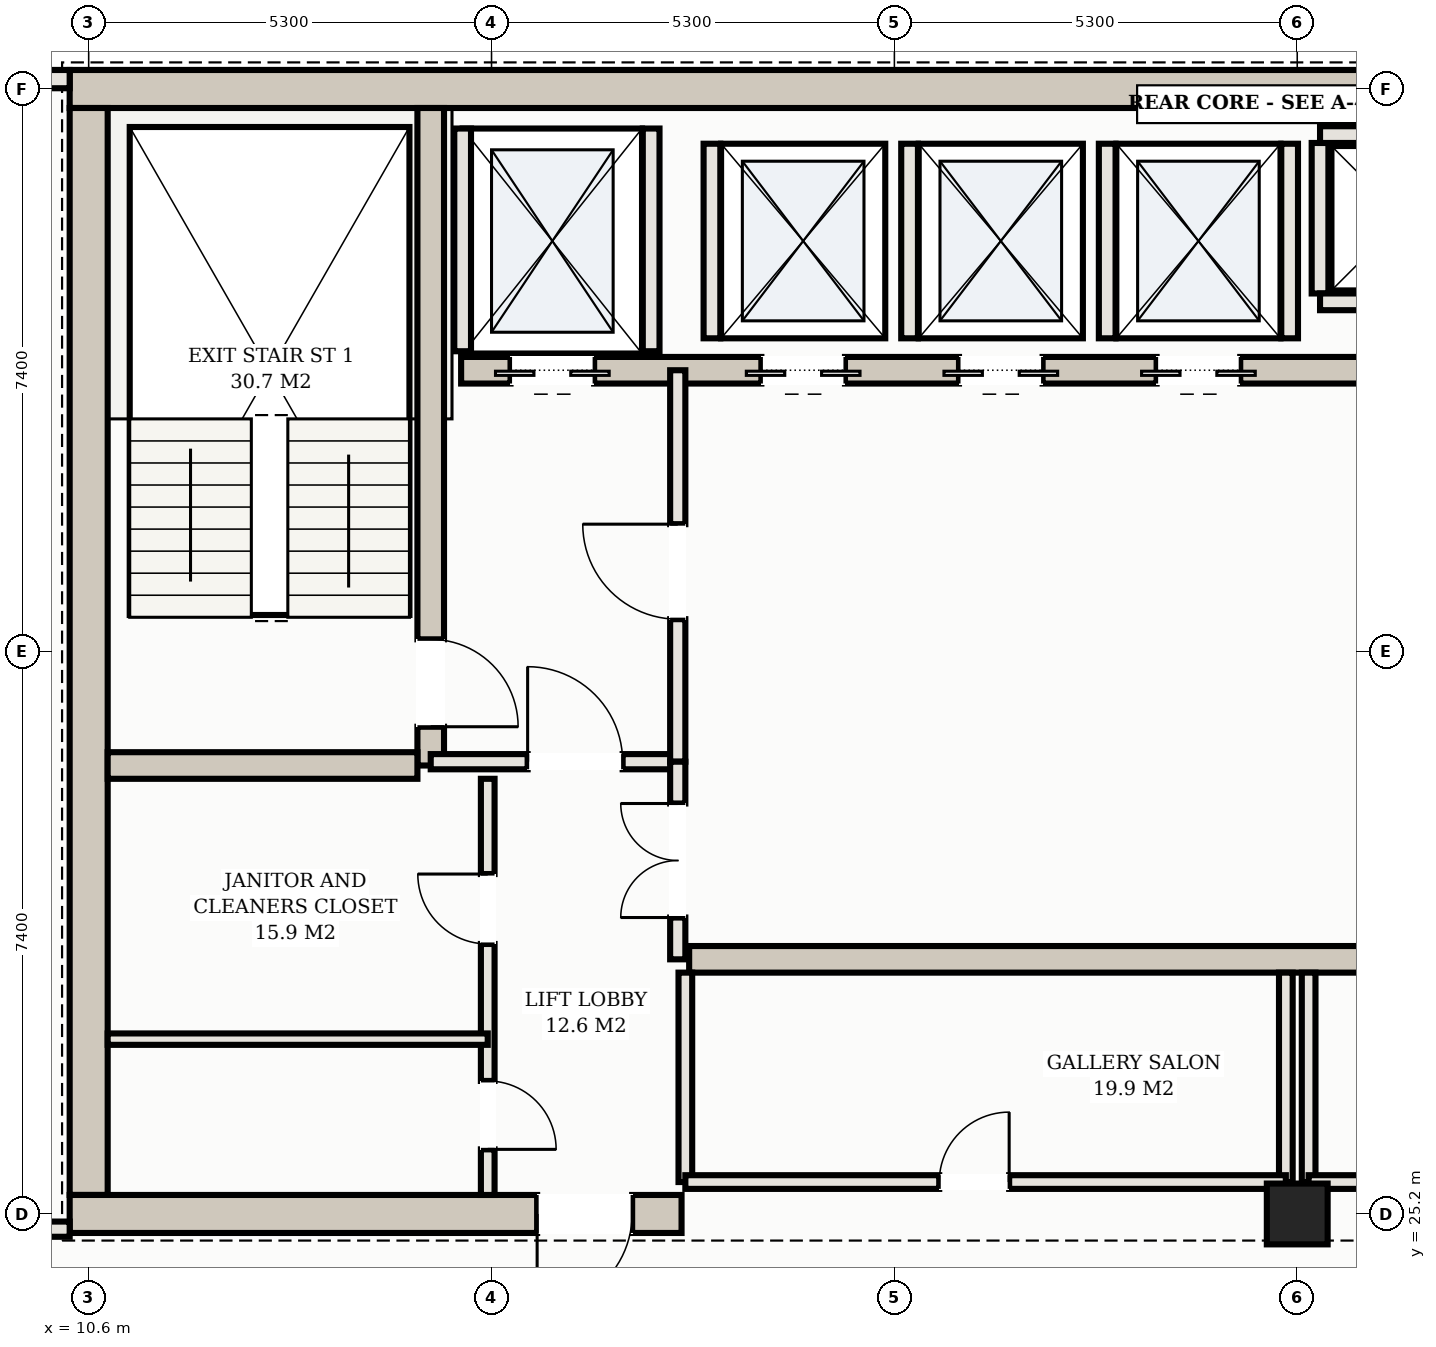
"""IFC4 building model, lengths in metres.
Left out: names, types, materials, properties, quantities, classifications, styles, units other than length and angle.
Written with IfcOpenShell. Run it as: python <this file> out.ifc"""

import sys

from ifc_helpers import new_model, si_unit, direction, frame, frame_2d, origin, origin_2d, place, context, subcontext, project, spatial, rectangle, hollow_rectangle, extrude, element, fill, save


model = new_model("IFC4")
c1 = context("Model", 3, precision=1e-05, world=origin(), true_north=direction((0.0, 1.0)))
c2 = subcontext(c1, "Body", "Model", "MODEL_VIEW")
j1 = project(units=[si_unit("LENGTHUNIT", "METRE"), si_unit("PLANEANGLEUNIT", "RADIAN")], contexts=[c1])
p1 = place(None, origin())
s1 = spatial("IfcSite", under=j1, at=p1, CompositionType="ELEMENT")
p2 = place(p1, origin())
s2 = spatial("IfcBuilding", under=s1, at=p2, CompositionType="ELEMENT")
p3 = place(p2, frame((0.0, 0.0, 209.9)))
s3 = spatial("IfcBuildingStorey", under=s2, at=p3, CompositionType="ELEMENT", Elevation=209.9)
p4 = place(p3, frame((10.35, 40.0, 0.0), z_axis=(0.0, 0.0, 1.0), x_axis=(1.0, 0.0, 0.0)))
e1 = element("IfcWall", 1, at=p4, inside=s3, PredefinedType="SHEAR", context=c2, shape_type="SweptSolid", body=[
    extrude(rectangle(XDim=32.3, YDim=0.5, at=frame_2d((16.15, 0.0))), origin(), (0.0, 0.0, 1.0), 3.11),
])
p5 = place(p3, frame((10.6, 25.45, 0.0), z_axis=(0.0, 0.0, 1.0), x_axis=(0.0, 1.0, 0.0)))
e2 = element("IfcWall", 2, at=p5, inside=s3, PredefinedType="SHEAR", context=c2, shape_type="SweptSolid", body=[
    extrude(rectangle(XDim=14.3, YDim=0.5, at=frame_2d((7.15, 0.0))), origin(), (0.0, 0.0, 1.0), 3.11),
])
p6 = place(p3, frame((10.35, 25.2, 0.0), z_axis=(0.0, 0.0, 1.0), x_axis=(1.0, 0.0, 0.0)))
e3 = element("IfcWall", 3, at=p6, inside=s3, PredefinedType="SHEAR", context=c2, shape_type="SweptSolid", body=[
    extrude(rectangle(XDim=8.05, YDim=0.5, at=frame_2d((4.025, 0.0))), origin(), (0.0, 0.0, 1.0), 3.11),
])
p7 = place(p6, frame((6.15, 0.0, 0.0)))
e4 = element("IfcOpeningElement", 4, at=p7, cuts=e3, PredefinedType="OPENING", context=c2, shape_type="SweptSolid", body=[
    extrude(rectangle(XDim=1.25, YDim=2.2, at=frame_2d((0.625, 1.1))), frame((0.0, 0.26, 0.0), z_axis=(0.0, -1.0, 0.0), x_axis=(1.0, 0.0, 0.0)), (0.0, 0.0, 1.0), 0.52),
])
p8 = place(p3, frame((15.1, 31.1, 0.0), z_axis=(0.0, 0.0, 1.0), x_axis=(0.0, 1.0, 0.0)))
e5 = element("IfcWall", 5, at=p8, inside=s3, PredefinedType="SHEAR", context=c2, shape_type="SweptSolid", body=[
    extrude(rectangle(XDim=8.65, YDim=0.35, at=frame_2d((4.325, 0.0))), origin(), (0.0, 0.0, 1.0), 3.11),
])
p9 = place(p8, frame((0.51, 0.0, 0.0)))
e6 = element("IfcOpeningElement", 6, at=p9, cuts=e5, PredefinedType="OPENING", context=c2, shape_type="SweptSolid", body=[
    extrude(rectangle(XDim=1.15, YDim=2.2, at=frame_2d((0.575, 1.1))), frame((0.0, 0.185, 0.0), z_axis=(0.0, -1.0, 0.0), x_axis=(1.0, 0.0, 0.0)), (0.0, 0.0, 1.0), 0.37),
])
p10 = place(p3, frame((10.85, 31.1, 0.0), z_axis=(0.0, 0.0, 1.0), x_axis=(1.0, 0.0, 0.0)))
e7 = element("IfcWall", 7, at=p10, inside=s3, PredefinedType="SHEAR", context=c2, shape_type="SweptSolid", body=[
    extrude(rectangle(XDim=4.075, YDim=0.35, at=frame_2d((2.038, 0.0))), origin(), (0.0, 0.0, 1.0), 3.11),
])
p11 = place(p3, frame((15.5, 36.3, 0.0), z_axis=(0.0, 0.0, 1.0), x_axis=(1.0, 0.0, 0.0)))
e8 = element("IfcWall", 8, at=p11, inside=s3, PredefinedType="SHEAR", context=c2, shape_type="SweptSolid", body=[
    extrude(rectangle(XDim=22.0, YDim=0.35, at=frame_2d((11.0, 0.0))), origin(), (0.0, 0.0, 1.0), 3.11),
])
p12 = place(p11, frame((0.65, 0.0, 0.0)))
e9 = element("IfcOpeningElement", 9, at=p12, cuts=e8, PredefinedType="OPENING", context=c2, shape_type="SweptSolid", body=[
    extrude(rectangle(XDim=1.1, YDim=2.15, at=frame_2d((0.55, 1.075))), frame((0.0, 0.185, 0.0), z_axis=(0.0, -1.0, 0.0), x_axis=(1.0, 0.0, 0.0)), (0.0, 0.0, 1.0), 0.37),
])
p13 = place(p11, frame((20.25, 0.0, 0.0)))
e10 = element("IfcOpeningElement", 10, at=p13, cuts=e8, PredefinedType="OPENING", context=c2, shape_type="SweptSolid", body=[
    extrude(rectangle(XDim=1.1, YDim=2.15, at=frame_2d((0.55, 1.075))), frame((0.0, 0.185, 0.0), z_axis=(0.0, -1.0, 0.0), x_axis=(1.0, 0.0, 0.0)), (0.0, 0.0, 1.0), 0.37),
])
p14 = place(p11, frame((17.05, 0.0, 0.0)))
e11 = element("IfcOpeningElement", 11, at=p14, cuts=e8, PredefinedType="OPENING", context=c2, shape_type="SweptSolid", body=[
    extrude(rectangle(XDim=1.3, YDim=2.2, at=frame_2d((0.65, 1.1))), frame((0.0, 0.185, 0.0), z_axis=(0.0, -1.0, 0.0), x_axis=(1.0, 0.0, 0.0)), (0.0, 0.0, 1.0), 0.37),
])
p15 = place(p11, frame((3.95, 0.0, 0.0)))
e12 = element("IfcOpeningElement", 12, at=p15, cuts=e8, PredefinedType="OPENING", context=c2, shape_type="SweptSolid", body=[
    extrude(rectangle(XDim=1.1, YDim=2.15, at=frame_2d((0.55, 1.075))), frame((0.0, 0.185, 0.0), z_axis=(0.0, -1.0, 0.0), x_axis=(1.0, 0.0, 0.0)), (0.0, 0.0, 1.0), 0.37),
])
p16 = place(p11, frame((6.55, 0.0, 0.0)))
e13 = element("IfcOpeningElement", 13, at=p16, cuts=e8, PredefinedType="OPENING", context=c2, shape_type="SweptSolid", body=[
    extrude(rectangle(XDim=1.1, YDim=2.15, at=frame_2d((0.55, 1.075))), frame((0.0, 0.185, 0.0), z_axis=(0.0, -1.0, 0.0), x_axis=(1.0, 0.0, 0.0)), (0.0, 0.0, 1.0), 0.37),
])
p17 = place(p11, frame((9.15, 0.0, 0.0)))
e14 = element("IfcOpeningElement", 14, at=p17, cuts=e8, PredefinedType="OPENING", context=c2, shape_type="SweptSolid", body=[
    extrude(rectangle(XDim=1.1, YDim=2.15, at=frame_2d((0.55, 1.075))), frame((0.0, 0.185, 0.0), z_axis=(0.0, -1.0, 0.0), x_axis=(1.0, 0.0, 0.0)), (0.0, 0.0, 1.0), 0.37),
])
p18 = place(p3, frame((18.5, 28.55, 0.0), z_axis=(0.0, 0.0, 1.0), x_axis=(1.0, 0.0, 0.0)))
e15 = element("IfcWall", 15, at=p18, inside=s3, PredefinedType="SHEAR", context=c2, shape_type="SweptSolid", body=[
    extrude(rectangle(XDim=16.0, YDim=0.35, at=frame_2d((8.0, 0.0))), origin(), (0.0, 0.0, 1.0), 3.11),
])
p19 = place(p3, frame((26.5, 25.2, 0.0), z_axis=(0.0, 0.0, 1.0), x_axis=(1.0, 0.0, 0.0)))
e16 = element("IfcColumn", 16, at=p19, inside=s3, PredefinedType="COLUMN", context=c2, shape_type="SweptSolid", body=[
    extrude(hollow_rectangle(XDim=0.8, YDim=0.8, WallThickness=0.028, at=origin_2d()), origin(), (0.0, 0.0, 1.0), 3.3),
])
for number, where, z_axis, x_axis in (
    (17, (15.52, 36.55, 0.0), (0.0, 0.0, 1.0), (0.0, 1.0, 0.0)),
    (18, (18.0, 36.55, 0.0), (0.0, 0.0, 1.0), (0.0, 1.0, 0.0)),
):
    element("IfcWall", number, at=place(p3, frame(where, z_axis=z_axis, x_axis=x_axis)), inside=s3, PredefinedType="SOLIDWALL", context=c2, shape_type="SweptSolid", body=[
        extrude(rectangle(XDim=2.93, YDim=0.22, at=frame_2d((1.465, 0.0))), origin(), (0.0, 0.0, 1.0), 3.11),
    ])
for number, where, z_axis, x_axis in (
    (19, (18.8, 36.72, 0.0), (0.0, 0.0, 1.0), (0.0, 1.0, 0.0)),
    (20, (21.4, 36.72, 0.0), (0.0, 0.0, 1.0), (0.0, 1.0, 0.0)),
    (21, (24.0, 36.72, 0.0), (0.0, 0.0, 1.0), (0.0, 1.0, 0.0)),
    (22, (26.4, 36.72, 0.0), (0.0, 0.0, 1.0), (0.0, 1.0, 0.0)),
):
    element("IfcWall", number, at=place(p3, frame(where, z_axis=z_axis, x_axis=x_axis)), inside=s3, PredefinedType="SOLIDWALL", context=c2, shape_type="SweptSolid", body=[
        extrude(rectangle(XDim=2.56, YDim=0.22, at=frame_2d((1.28, 0.0))), origin(), (0.0, 0.0, 1.0), 3.11),
    ])
p20 = place(p3, frame((26.8, 37.31, 0.0), z_axis=(0.0, 0.0, 1.0), x_axis=(0.0, 1.0, 0.0)))
e23 = element("IfcWall", 23, at=p20, inside=s3, PredefinedType="SOLIDWALL", context=c2, shape_type="SweptSolid", body=[
    extrude(rectangle(XDim=1.98, YDim=0.22, at=frame_2d((0.99, 0.0))), origin(), (0.0, 0.0, 1.0), 3.11),
])
for number, where, z_axis, x_axis in (
    (24, (26.8, 39.4, 0.0), (0.0, 0.0, 1.0), (1.0, 0.0, 0.0)),
    (25, (26.8, 37.2, 0.0), (0.0, 0.0, 1.0), (1.0, 0.0, 0.0)),
):
    element("IfcWall", number, at=place(p3, frame(where, z_axis=z_axis, x_axis=x_axis)), inside=s3, PredefinedType="SOLIDWALL", context=c2, shape_type="SweptSolid", body=[
        extrude(rectangle(XDim=2.2, YDim=0.22, at=frame_2d((1.1, 0.0))), origin(), (0.0, 0.0, 1.0), 3.11),
    ])
p21 = place(p3, frame((10.35, 40.13, 0.0), z_axis=(0.0, 0.0, 1.0), x_axis=(-1.0, 0.0, 0.0)))
e26 = element("IfcWall", 26, at=p21, inside=s3, PredefinedType="SOLIDWALL", context=c2, shape_type="SweptSolid", body=[
    extrude(rectangle(XDim=0.3, YDim=0.24, at=frame_2d((0.15, 0.0))), origin(), (0.0, 0.0, 1.0), 3.11),
])
p22 = place(p3, frame((15.1, 31.15, 0.0), z_axis=(0.0, 0.0, 1.0), x_axis=(1.0, 0.0, 0.0)))
e27 = element("IfcWall", 27, at=p22, inside=s3, PredefinedType="PARTITIONING", context=c2, shape_type="SweptSolid", body=[
    extrude(rectangle(XDim=3.25, YDim=0.2, at=frame_2d((1.625, 0.0))), origin(), (0.0, 0.0, 1.0), 2.43),
])
p23 = place(p22, frame((1.275, 0.0, 0.0)))
e28 = element("IfcOpeningElement", 28, at=p23, cuts=e27, PredefinedType="OPENING", context=c2, shape_type="SweptSolid", body=[
    extrude(rectangle(XDim=1.25, YDim=2.2, at=frame_2d((0.625, 1.1))), frame((0.0, 0.11, 0.0), z_axis=(0.0, -1.0, 0.0), x_axis=(1.0, 0.0, 0.0)), (0.0, 0.0, 1.0), 0.22),
])
p24 = place(p3, frame((18.35, 31.15, 0.0), z_axis=(0.0, 0.0, 1.0), x_axis=(0.0, 1.0, 0.0)))
e29 = element("IfcWall", 29, at=p24, inside=s3, PredefinedType="PARTITIONING", context=c2, shape_type="SweptSolid", body=[
    extrude(rectangle(XDim=5.15, YDim=0.2, at=frame_2d((2.575, 0.0))), origin(), (0.0, 0.0, 1.0), 2.43),
])
p25 = place(p24, frame((1.875, 0.0, 0.0)))
e30 = element("IfcOpeningElement", 30, at=p25, cuts=e29, PredefinedType="OPENING", context=c2, shape_type="SweptSolid", body=[
    extrude(rectangle(XDim=1.25, YDim=2.2, at=frame_2d((0.625, 1.1))), frame((0.0, 0.11, 0.0), z_axis=(0.0, -1.0, 0.0), x_axis=(1.0, 0.0, 0.0)), (0.0, 0.0, 1.0), 0.22),
])
p26 = place(p3, frame((15.85, 25.45, 0.0), z_axis=(0.0, 0.0, 1.0), x_axis=(0.0, 1.0, 0.0)))
e31 = element("IfcWall", 31, at=p26, inside=s3, PredefinedType="PARTITIONING", context=c2, shape_type="SweptSolid", body=[
    extrude(rectangle(XDim=5.475, YDim=0.18, at=frame_2d((2.738, 0.0))), origin(), (0.0, 0.0, 1.0), 2.43),
])
p27 = place(p26, frame((0.6, 0.0, 0.0)))
e32 = element("IfcOpeningElement", 32, at=p27, cuts=e31, PredefinedType="OPENING", context=c2, shape_type="SweptSolid", body=[
    extrude(rectangle(XDim=0.9, YDim=2.15, at=frame_2d((0.45, 1.075))), frame((0.0, 0.1, 0.0), z_axis=(0.0, -1.0, 0.0), x_axis=(1.0, 0.0, 0.0)), (0.0, 0.0, 1.0), 0.2),
])
p28 = place(p26, frame((3.302, 0.0, 0.0)))
e33 = element("IfcOpeningElement", 33, at=p28, cuts=e31, PredefinedType="OPENING", context=c2, shape_type="SweptSolid", body=[
    extrude(rectangle(XDim=0.92, YDim=2.15, at=frame_2d((0.46, 1.075))), frame((0.0, 0.1, 0.0), z_axis=(0.0, -1.0, 0.0), x_axis=(1.0, 0.0, 0.0)), (0.0, 0.0, 1.0), 0.2),
])
p29 = place(p3, frame((10.85, 27.5, 0.0), z_axis=(0.0, 0.0, 1.0), x_axis=(1.0, 0.0, 0.0)))
e34 = element("IfcWall", 34, at=p29, inside=s3, PredefinedType="PARTITIONING", context=c2, shape_type="SweptSolid", body=[
    extrude(rectangle(XDim=5.0, YDim=0.15, at=frame_2d((2.5, 0.0))), origin(), (0.0, 0.0, 1.0), 2.43),
])
p30 = place(p3, frame((18.35, 28.55, 0.0), z_axis=(0.0, 0.0, 1.0), x_axis=(0.0, 1.0, 0.0)))
e35 = element("IfcWall", 35, at=p30, inside=s3, PredefinedType="PARTITIONING", context=c2, shape_type="SweptSolid", body=[
    extrude(rectangle(XDim=2.6, YDim=0.2, at=frame_2d((1.3, 0.0))), origin(), (0.0, 0.0, 1.0), 2.43),
])
p31 = place(p30, frame((0.55, 0.0, 0.0)))
e36 = element("IfcOpeningElement", 36, at=p31, cuts=e35, PredefinedType="OPENING", context=c2, shape_type="SweptSolid", body=[
    extrude(rectangle(XDim=1.5, YDim=2.25, at=frame_2d((0.75, 1.125))), frame((0.0, 0.11, 0.0), z_axis=(0.0, -1.0, 0.0), x_axis=(1.0, 0.0, 0.0)), (0.0, 0.0, 1.0), 0.22),
])
for number, where, z_axis, x_axis in (
    (37, (18.45, 25.62, 0.0), (0.0, 0.0, 1.0), (0.0, 1.0, 0.0)),
    (38, (26.35, 25.62, 0.0), (0.0, 0.0, 1.0), (0.0, 1.0, 0.0)),
):
    element("IfcWall", number, at=place(p3, frame(where, z_axis=z_axis, x_axis=x_axis)), inside=s3, PredefinedType="PARTITIONING", context=c2, shape_type="SweptSolid", body=[
        extrude(rectangle(XDim=2.755, YDim=0.18, at=frame_2d((1.377, 0.0))), origin(), (0.0, 0.0, 1.0), 2.43),
    ])
p32 = place(p3, frame((18.45, 25.62, 0.0), z_axis=(0.0, 0.0, 1.0), x_axis=(1.0, 0.0, 0.0)))
e39 = element("IfcWall", 39, at=p32, inside=s3, PredefinedType="PARTITIONING", context=c2, shape_type="SweptSolid", body=[
    extrude(rectangle(XDim=7.9, YDim=0.18, at=frame_2d((3.95, 0.0))), origin(), (0.0, 0.0, 1.0), 2.43),
])
p33 = place(p32, frame((3.34, 0.0, 0.0)))
e40 = element("IfcOpeningElement", 40, at=p33, cuts=e39, PredefinedType="OPENING", context=c2, shape_type="SweptSolid", body=[
    extrude(rectangle(XDim=0.92, YDim=2.15, at=frame_2d((0.46, 1.075))), frame((0.0, 0.1, 0.0), z_axis=(0.0, -1.0, 0.0), x_axis=(1.0, 0.0, 0.0)), (0.0, 0.0, 1.0), 0.2),
])
p34 = place(p3, frame((26.65, 25.62, 0.0), z_axis=(0.0, 0.0, 1.0), x_axis=(0.0, 1.0, 0.0)))
e41 = element("IfcWall", 41, at=p34, inside=s3, PredefinedType="PARTITIONING", context=c2, shape_type="SweptSolid", body=[
    extrude(rectangle(XDim=2.755, YDim=0.18, at=frame_2d((1.377, 0.0))), origin(), (0.0, 0.0, 1.0), 2.43),
])
p35 = place(p3, frame((26.65, 25.62, 0.0), z_axis=(0.0, 0.0, 1.0), x_axis=(1.0, 0.0, 0.0)))
e42 = element("IfcWall", 42, at=p35, inside=s3, PredefinedType="PARTITIONING", context=c2, shape_type="SweptSolid", body=[
    extrude(rectangle(XDim=7.9, YDim=0.18, at=frame_2d((3.95, 0.0))), origin(), (0.0, 0.0, 1.0), 2.43),
])
p36 = place(p35, frame((3.34, 0.0, 0.0)))
e43 = element("IfcOpeningElement", 43, at=p36, cuts=e42, PredefinedType="OPENING", context=c2, shape_type="SweptSolid", body=[
    extrude(rectangle(XDim=0.92, YDim=2.15, at=frame_2d((0.46, 1.075))), frame((0.0, 0.1, 0.0), z_axis=(0.0, -1.0, 0.0), x_axis=(1.0, 0.0, 0.0)), (0.0, 0.0, 1.0), 0.2),
])
p37 = place(p3, frame((6.72, 25.0, 0.0), z_axis=(0.0, 0.0, 1.0), x_axis=(1.0, 0.0, 0.0)))
e44 = element("IfcWall", 44, at=p37, inside=s3, PredefinedType="PARTITIONING", context=c2, shape_type="SweptSolid", body=[
    extrude(rectangle(XDim=3.63, YDim=0.2, at=frame_2d((1.815, 0.0))), origin(), (0.0, 0.0, 1.0), 2.43),
])
p38 = place(p37, frame((2.305, 0.0, 0.0)))
e45 = element("IfcOpeningElement", 45, at=p38, cuts=e44, PredefinedType="OPENING", context=c2, shape_type="SweptSolid", body=[
    extrude(rectangle(XDim=0.92, YDim=2.15, at=frame_2d((0.46, 1.075))), frame((0.0, 0.11, 0.0), z_axis=(0.0, -1.0, 0.0), x_axis=(1.0, 0.0, 0.0)), (0.0, 0.0, 1.0), 0.22),
])
p39 = place(p12, frame((1.1, 0.0, 0.0), z_axis=(0.0, 0.0, 1.0), x_axis=(-1.0, 0.0, 0.0)))
e46 = element("IfcDoor", 46, at=p39, inside=s3, OperationType="DOUBLE_DOOR_SLIDING", PredefinedType="DOOR", context=c2, shape_type="SweptSolid", body=[
    extrude(rectangle(XDim=1.1, YDim=2.15, at=frame_2d((0.55, 1.075))), frame((0.0, 0.025, 0.0), z_axis=(0.0, -1.0, 0.0), x_axis=(1.0, 0.0, 0.0)), (0.0, 0.0, 1.0), 0.05),
])
fill(e9, e46)
p40 = place(p15, frame((1.1, 0.0, 0.0), z_axis=(0.0, 0.0, 1.0), x_axis=(-1.0, 0.0, 0.0)))
e47 = element("IfcDoor", 47, at=p40, inside=s3, OperationType="DOUBLE_DOOR_SLIDING", PredefinedType="DOOR", context=c2, shape_type="SweptSolid", body=[
    extrude(rectangle(XDim=1.1, YDim=2.15, at=frame_2d((0.55, 1.075))), frame((0.0, 0.025, 0.0), z_axis=(0.0, -1.0, 0.0), x_axis=(1.0, 0.0, 0.0)), (0.0, 0.0, 1.0), 0.05),
])
fill(e12, e47)
p41 = place(p16, frame((1.1, 0.0, 0.0), z_axis=(0.0, 0.0, 1.0), x_axis=(-1.0, 0.0, 0.0)))
e48 = element("IfcDoor", 48, at=p41, inside=s3, OperationType="DOUBLE_DOOR_SLIDING", PredefinedType="DOOR", context=c2, shape_type="SweptSolid", body=[
    extrude(rectangle(XDim=1.1, YDim=2.15, at=frame_2d((0.55, 1.075))), frame((0.0, 0.025, 0.0), z_axis=(0.0, -1.0, 0.0), x_axis=(1.0, 0.0, 0.0)), (0.0, 0.0, 1.0), 0.05),
])
fill(e13, e48)
p42 = place(p17, frame((1.1, 0.0, 0.0), z_axis=(0.0, 0.0, 1.0), x_axis=(-1.0, 0.0, 0.0)))
e49 = element("IfcDoor", 49, at=p42, inside=s3, OperationType="DOUBLE_DOOR_SLIDING", PredefinedType="DOOR", context=c2, shape_type="SweptSolid", body=[
    extrude(rectangle(XDim=1.1, YDim=2.15, at=frame_2d((0.55, 1.075))), frame((0.0, 0.025, 0.0), z_axis=(0.0, -1.0, 0.0), x_axis=(1.0, 0.0, 0.0)), (0.0, 0.0, 1.0), 0.05),
])
fill(e14, e49)
p43 = place(p7, frame((1.25, 0.0, 0.0), z_axis=(0.0, 0.0, 1.0), x_axis=(-1.0, 0.0, 0.0)))
e50 = element("IfcDoor", 50, at=p43, inside=s3, OperationType="SINGLE_SWING_RIGHT", PredefinedType="DOOR", context=c2, shape_type="SweptSolid", body=[
    extrude(rectangle(XDim=1.25, YDim=2.2, at=frame_2d((0.625, 1.1))), frame((0.0, 0.025, 0.0), z_axis=(0.0, -1.0, 0.0), x_axis=(1.0, 0.0, 0.0)), (0.0, 0.0, 1.0), 0.05),
])
fill(e4, e50)
p44 = place(p23, origin())
e51 = element("IfcDoor", 51, at=p44, inside=s3, OperationType="SINGLE_SWING_LEFT", PredefinedType="DOOR", context=c2, shape_type="SweptSolid", body=[
    extrude(rectangle(XDim=1.25, YDim=2.2, at=frame_2d((0.625, 1.1))), frame((0.0, 0.025, 0.0), z_axis=(0.0, -1.0, 0.0), x_axis=(1.0, 0.0, 0.0)), (0.0, 0.0, 1.0), 0.05),
])
fill(e28, e51)
p45 = place(p25, origin())
e52 = element("IfcDoor", 52, at=p45, inside=s3, OperationType="SINGLE_SWING_RIGHT", PredefinedType="DOOR", context=c2, shape_type="SweptSolid", body=[
    extrude(rectangle(XDim=1.25, YDim=2.2, at=frame_2d((0.625, 1.1))), frame((0.0, 0.025, 0.0), z_axis=(0.0, -1.0, 0.0), x_axis=(1.0, 0.0, 0.0)), (0.0, 0.0, 1.0), 0.05),
])
fill(e30, e52)
p46 = place(p9, frame((1.15, 0.0, 0.0), z_axis=(0.0, 0.0, 1.0), x_axis=(-1.0, 0.0, 0.0)))
e53 = element("IfcDoor", 53, at=p46, inside=s3, OperationType="SINGLE_SWING_RIGHT", PredefinedType="DOOR", context=c2, shape_type="SweptSolid", body=[
    extrude(rectangle(XDim=1.15, YDim=2.2, at=frame_2d((0.575, 1.1))), frame((0.0, 0.025, 0.0), z_axis=(0.0, -1.0, 0.0), x_axis=(1.0, 0.0, 0.0)), (0.0, 0.0, 1.0), 0.05),
])
fill(e6, e53)
p47 = place(p27, frame((0.9, 0.0, 0.0), z_axis=(0.0, 0.0, 1.0), x_axis=(-1.0, 0.0, 0.0)))
e54 = element("IfcDoor", 54, at=p47, inside=s3, OperationType="SINGLE_SWING_RIGHT", PredefinedType="DOOR", context=c2, shape_type="SweptSolid", body=[
    extrude(rectangle(XDim=0.9, YDim=2.15, at=frame_2d((0.45, 1.075))), frame((0.0, 0.025, 0.0), z_axis=(0.0, -1.0, 0.0), x_axis=(1.0, 0.0, 0.0)), (0.0, 0.0, 1.0), 0.05),
])
fill(e32, e54)
p48 = place(p28, origin())
e55 = element("IfcDoor", 55, at=p48, inside=s3, OperationType="SINGLE_SWING_RIGHT", PredefinedType="DOOR", context=c2, shape_type="SweptSolid", body=[
    extrude(rectangle(XDim=0.92, YDim=2.15, at=frame_2d((0.46, 1.075))), frame((0.0, 0.025, 0.0), z_axis=(0.0, -1.0, 0.0), x_axis=(1.0, 0.0, 0.0)), (0.0, 0.0, 1.0), 0.05),
])
fill(e33, e55)
p49 = place(p31, origin())
e56 = element("IfcDoor", 56, at=p49, inside=s3, OperationType="DOUBLE_DOOR_SINGLE_SWING", PredefinedType="DOOR", context=c2, shape_type="SweptSolid", body=[
    extrude(rectangle(XDim=1.5, YDim=2.25, at=frame_2d((0.75, 1.125))), frame((0.0, 0.025, 0.0), z_axis=(0.0, -1.0, 0.0), x_axis=(1.0, 0.0, 0.0)), (0.0, 0.0, 1.0), 0.05),
])
fill(e36, e56)
p50 = place(p33, origin())
e57 = element("IfcDoor", 57, at=p50, inside=s3, OperationType="SINGLE_SWING_RIGHT", PredefinedType="DOOR", context=c2, shape_type="SweptSolid", body=[
    extrude(rectangle(XDim=0.92, YDim=2.15, at=frame_2d((0.46, 1.075))), frame((0.0, 0.025, 0.0), z_axis=(0.0, -1.0, 0.0), x_axis=(1.0, 0.0, 0.0)), (0.0, 0.0, 1.0), 0.05),
])
fill(e40, e57)
save(model, sys.argv[1])
